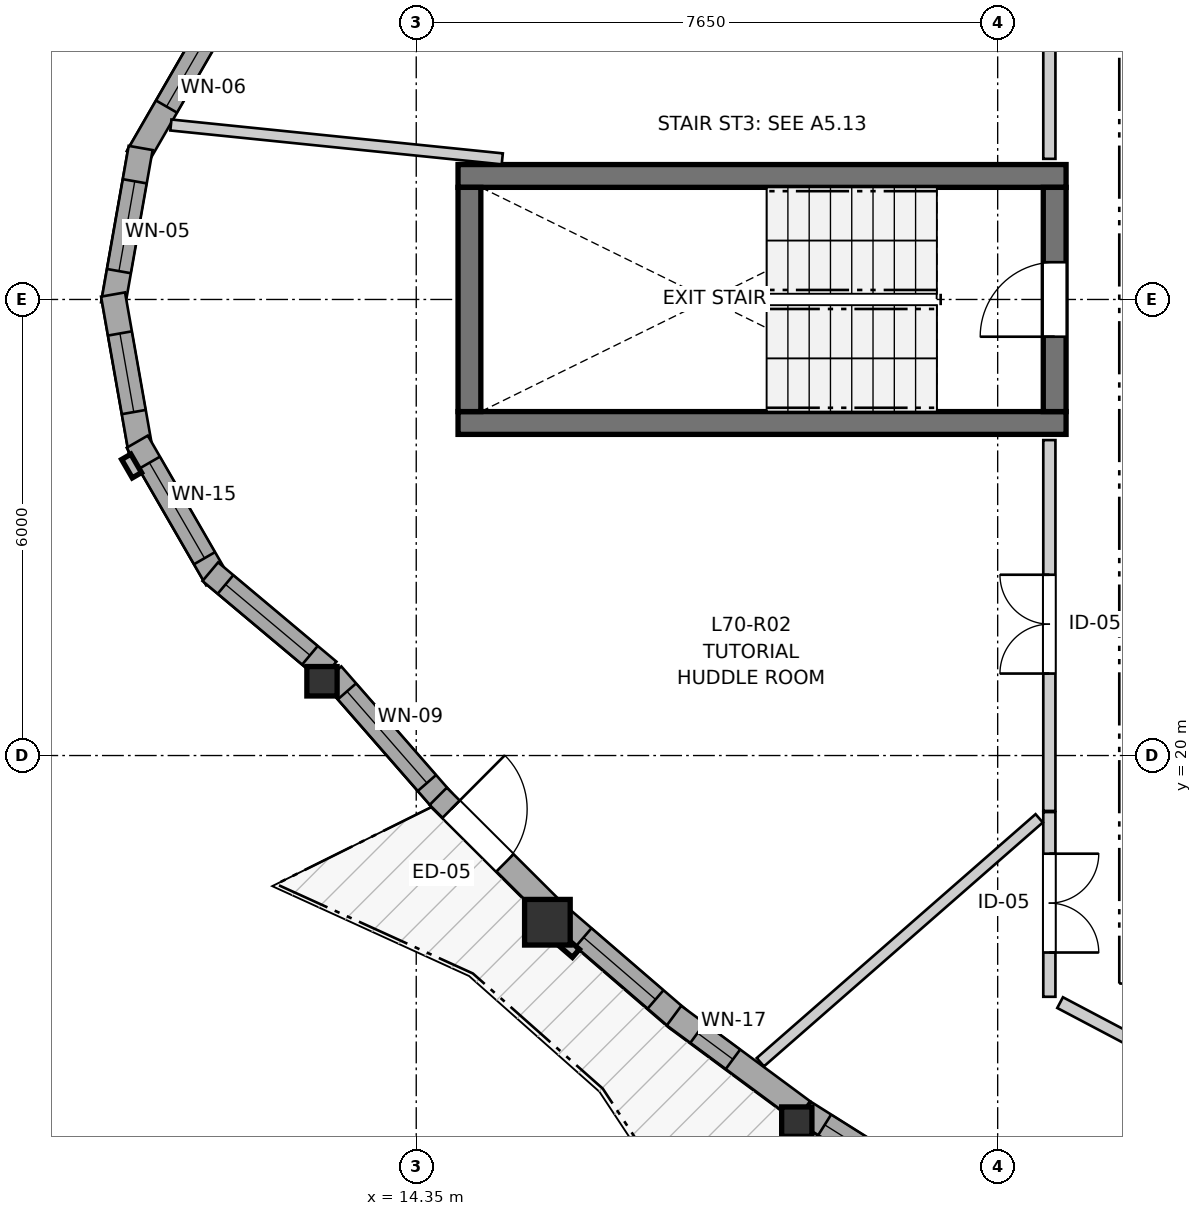
"""IFC4 building model, lengths in metres.
Left out: names, types, materials, properties, quantities, classifications, styles, units other than length and angle.
Written with IfcOpenShell. Run it as: python <this file> out.ifc"""

import sys

from ifc_helpers import new_model, si_unit, direction, frame, frame_2d, origin, origin_2d, place, context, subcontext, project, spatial, rectangle, i_section, extrude, source, transform, mapped, element, fill, save


model = new_model("IFC4")
c1 = context("Model", 3, precision=1e-05, world=origin(), true_north=direction((0.0, 1.0)))
c2 = subcontext(c1, "Body", "Model", "MODEL_VIEW")
j1 = project(units=[si_unit("LENGTHUNIT", "METRE"), si_unit("PLANEANGLEUNIT", "RADIAN")], contexts=[c1])
p1 = place(None, origin())
s1 = spatial("IfcSite", under=j1, at=p1, CompositionType="ELEMENT")
p2 = place(p1, origin())
s2 = spatial("IfcBuilding", under=s1, at=p2, CompositionType="ELEMENT")
p3 = place(p2, frame((0.0, 0.0, 234.0)))
s3 = spatial("IfcBuildingStorey", under=s2, at=p3, CompositionType="ELEMENT", Elevation=234.0)
for number, where, z_axis, x_axis in (
    (1, (14.9, 24.375, 0.0), (0.0, 0.0, 1.0), (1.0, 0.0, 0.0)),
    (2, (22.9, 27.625, 0.0), (0.0, 0.0, 1.0), (-1.0, 0.0, 0.0)),
):
    element("IfcWall", number, at=place(p3, frame(where, z_axis=z_axis, x_axis=x_axis)), inside=s3, PredefinedType="SHEAR", context=c2, shape_type="SweptSolid", body=[
        extrude(rectangle(XDim=8.0, YDim=0.3, at=frame_2d((4.0, 0.0))), origin(), (0.0, 0.0, 1.0), 2.96),
    ])
p4 = place(p3, frame((15.05, 27.475, 0.0), z_axis=(0.0, 0.0, 1.0), x_axis=(0.0, -1.0, 0.0)))
e3 = element("IfcWall", 3, at=p4, inside=s3, PredefinedType="SHEAR", context=c2, shape_type="SweptSolid", body=[
    extrude(rectangle(XDim=2.95, YDim=0.3, at=frame_2d((1.475, 0.0))), origin(), (0.0, 0.0, 1.0), 2.96),
])
p5 = place(p3, frame((22.75, 24.525, 0.0), z_axis=(0.0, 0.0, 1.0), x_axis=(0.0, 1.0, 0.0)))
e4 = element("IfcWall", 4, at=p5, inside=s3, PredefinedType="SHEAR", context=c2, shape_type="SweptSolid", body=[
    extrude(rectangle(XDim=2.95, YDim=0.3, at=frame_2d((1.475, 0.0))), origin(), (0.0, 0.0, 1.0), 2.96),
])
p6 = place(p5, frame((0.985, 0.0, 0.0)))
e5 = element("IfcOpeningElement", 5, at=p6, cuts=e4, PredefinedType="OPENING", context=c2, shape_type="SweptSolid", body=[
    extrude(rectangle(XDim=0.98, YDim=2.15, at=frame_2d((0.49, 1.075))), frame((0.0, 0.16, 0.0), z_axis=(0.0, -1.0, 0.0), x_axis=(1.0, 0.0, 0.0)), (0.0, 0.0, 1.0), 0.32),
])
m1 = source(origin(), c2, "Body", "SweptSolid", [
    extrude(i_section(OverallWidth=0.398, OverallDepth=0.387, WebThickness=0.019, FlangeThickness=0.03, FilletRadius=0.015, at=origin_2d()), origin(), (0.0, 0.0, 1.0), 2.96),
])
p7 = place(p3, frame((13.11, 20.977, 0.0), z_axis=(0.0, 0.0, 1.0), x_axis=(1.0, 0.0, 0.0)))
e6 = element("IfcColumn", 6, at=p7, inside=s3, PredefinedType="PILASTER", context=c2, shape_type="MappedRepresentation", body=[
    mapped(m1, transform((0.0, 0.0, 0.0), x_axis=(1.0, 0.0, 0.0), y_axis=(0.0, 1.0, 0.0), z_axis=(0.0, 0.0, 1.0), scale=1.0)),
])
m2 = source(origin(), c2, "Body", "SweptSolid", [
    extrude(rectangle(XDim=0.6, YDim=0.6, at=origin_2d()), origin(), (0.0, 0.0, 1.0), 2.96),
])
p8 = place(p3, frame((16.076, 17.807, 0.0), z_axis=(0.0, 0.0, 1.0), x_axis=(1.0, 0.0, 0.0)))
e7 = element("IfcColumn", 7, at=p8, inside=s3, PredefinedType="COLUMN", context=c2, shape_type="MappedRepresentation", body=[
    mapped(m2, transform((0.0, 0.0, 0.0), x_axis=(1.0, 0.0, 0.0), y_axis=(0.0, 1.0, 0.0), z_axis=(0.0, 0.0, 1.0), scale=1.0)),
])
p9 = place(p3, frame((19.357, 15.183, 0.0), z_axis=(0.0, 0.0, 1.0), x_axis=(1.0, 0.0, 0.0)))
e8 = element("IfcColumn", 8, at=p9, inside=s3, PredefinedType="PILASTER", context=c2, shape_type="MappedRepresentation", body=[
    mapped(m1, transform((0.0, 0.0, 0.0), x_axis=(1.0, 0.0, 0.0), y_axis=(0.0, 1.0, 0.0), z_axis=(0.0, 0.0, 1.0), scale=1.0)),
])
p10 = place(p3, frame((11.725, 29.681, 0.0), z_axis=(0.0, 0.0, 1.0), x_axis=(-0.499995423472, -0.866028046028, 0.0)))
e9 = element("IfcWall", 9, at=p10, inside=s3, PredefinedType="SOLIDWALL", context=c2, shape_type="SweptSolid", body=[
    extrude(rectangle(XDim=2.09, YDim=0.32, at=frame_2d((1.045, 0.0))), origin(), (0.0, 0.0, 1.0), 2.58),
])
p11 = place(p10, frame((0.27, 0.0, 0.82)))
e10 = element("IfcOpeningElement", 10, at=p11, cuts=e9, PredefinedType="OPENING", context=c2, shape_type="SweptSolid", body=[
    extrude(rectangle(XDim=1.05, YDim=1.45, at=frame_2d((0.525, 0.725))), frame((0.0, 0.17, 0.0), z_axis=(0.0, -1.0, 0.0), x_axis=(1.0, 0.0, 0.0)), (0.0, 0.0, 1.0), 0.34),
])
p12 = place(p3, frame((10.724, 27.993, 0.0), z_axis=(0.0, 0.0, 1.0), x_axis=(-0.173672066494, -0.984803540469, 0.0)))
e11 = element("IfcWall", 11, at=p12, inside=s3, PredefinedType="SOLIDWALL", context=c2, shape_type="SweptSolid", body=[
    extrude(rectangle(XDim=2.09, YDim=0.32, at=frame_2d((1.045, 0.0))), origin(), (0.0, 0.0, 1.0), 2.58),
])
p13 = place(p12, frame((0.445, 0.0, 0.82)))
e12 = element("IfcOpeningElement", 12, at=p13, cuts=e11, PredefinedType="OPENING", context=c2, shape_type="SweptSolid", body=[
    extrude(rectangle(XDim=1.2, YDim=1.45, at=frame_2d((0.6, 0.725))), frame((0.0, 0.17, 0.0), z_axis=(0.0, -1.0, 0.0), x_axis=(1.0, 0.0, 0.0)), (0.0, 0.0, 1.0), 0.34),
])
p14 = place(p3, frame((10.361, 26.065, 0.0), z_axis=(0.0, 0.0, 1.0), x_axis=(0.173672066494, -0.984803540469, 0.0)))
e13 = element("IfcWall", 13, at=p14, inside=s3, PredefinedType="SOLIDWALL", context=c2, shape_type="SweptSolid", body=[
    extrude(rectangle(XDim=2.09, YDim=0.32, at=frame_2d((1.045, 0.0))), origin(), (0.0, 0.0, 1.0), 2.58),
])
p15 = place(p14, frame((0.52, 0.0, 0.82)))
e14 = element("IfcOpeningElement", 14, at=p15, cuts=e13, PredefinedType="OPENING", context=c2, shape_type="SweptSolid", body=[
    extrude(rectangle(XDim=1.05, YDim=1.45, at=frame_2d((0.525, 0.725))), frame((0.0, 0.17, 0.0), z_axis=(0.0, -1.0, 0.0), x_axis=(1.0, 0.0, 0.0)), (0.0, 0.0, 1.0), 0.34),
])
p16 = place(p3, frame((10.679, 24.129, 0.0), z_axis=(0.0, 0.0, 1.0), x_axis=(0.499995423472, -0.866028046028, 0.0)))
e15 = element("IfcWall", 15, at=p16, inside=s3, PredefinedType="SOLIDWALL", context=c2, shape_type="SweptSolid", body=[
    extrude(rectangle(XDim=2.09, YDim=0.32, at=frame_2d((1.045, 0.0))), origin(), (0.0, 0.0, 1.0), 2.58),
])
p17 = place(p16, frame((0.32, 0.0, 0.82)))
e16 = element("IfcOpeningElement", 16, at=p17, cuts=e15, PredefinedType="OPENING", context=c2, shape_type="SweptSolid", body=[
    extrude(rectangle(XDim=1.45, YDim=1.25, at=frame_2d((0.725, 0.625))), frame((0.0, 0.17, 0.0), z_axis=(0.0, -1.0, 0.0), x_axis=(1.0, 0.0, 0.0)), (0.0, 0.0, 1.0), 0.34),
])
p18 = place(p3, frame((11.641, 22.419, 0.0), z_axis=(0.0, 0.0, 1.0), x_axis=(0.766099948115, -0.642721455608, 0.0)))
e17 = element("IfcWall", 17, at=p18, inside=s3, PredefinedType="SOLIDWALL", context=c2, shape_type="SweptSolid", body=[
    extrude(rectangle(XDim=2.032, YDim=0.32, at=frame_2d((1.016, 0.0))), origin(), (0.0, 0.0, 1.0), 2.58),
])
p19 = place(p18, frame((0.261, 0.0, 0.82)))
e18 = element("IfcOpeningElement", 18, at=p19, cuts=e17, PredefinedType="OPENING", context=c2, shape_type="SweptSolid", body=[
    extrude(rectangle(XDim=1.45, YDim=1.25, at=frame_2d((0.725, 0.625))), frame((0.0, 0.17, 0.0), z_axis=(0.0, -1.0, 0.0), x_axis=(1.0, 0.0, 0.0)), (0.0, 0.0, 1.0), 0.34),
])
p20 = place(p3, frame((13.244, 21.067, 0.0), z_axis=(0.0, 0.0, 1.0), x_axis=(0.657605974143, -0.753362052914, 0.0)))
e19 = element("IfcWall", 19, at=p20, inside=s3, PredefinedType="SOLIDWALL", context=c2, shape_type="SweptSolid", body=[
    extrude(rectangle(XDim=2.213, YDim=0.32, at=frame_2d((1.106, 0.0))), origin(), (0.0, 0.0, 1.0), 2.58),
])
p21 = place(p20, frame((0.296, 0.0, 0.82)))
e20 = element("IfcOpeningElement", 20, at=p21, cuts=e19, PredefinedType="OPENING", context=c2, shape_type="SweptSolid", body=[
    extrude(rectangle(XDim=1.6, YDim=1.35, at=frame_2d((0.8, 0.675))), frame((0.0, 0.17, 0.0), z_axis=(0.0, -1.0, 0.0), x_axis=(1.0, 0.0, 0.0)), (0.0, 0.0, 1.0), 0.34),
])
p22 = place(p3, frame((14.639, 19.464, 0.0), z_axis=(0.0, 0.0, 1.0), x_axis=(0.708386188287, -0.705825054985, 0.0)))
e21 = element("IfcWall", 21, at=p22, inside=s3, PredefinedType="SOLIDWALL", context=c2, shape_type="SweptSolid", body=[
    extrude(rectangle(XDim=2.097, YDim=0.32, at=frame_2d((1.049, 0.0))), origin(), (0.0, 0.0, 1.0), 2.58),
])
p23 = place(p22, frame((0.24, 0.0, 0.0)))
e22 = element("IfcOpeningElement", 22, at=p23, cuts=e21, PredefinedType="OPENING", context=c2, shape_type="SweptSolid", body=[
    extrude(rectangle(XDim=1.0, YDim=2.1, at=frame_2d((0.5, 1.05))), frame((0.0, 0.17, 0.0), z_axis=(0.0, -1.0, 0.0), x_axis=(1.0, 0.0, 0.0)), (0.0, 0.0, 1.0), 0.34),
])
p24 = place(p3, frame((16.248, 17.869, 0.0), z_axis=(0.0, 0.0, 1.0), x_axis=(0.757506883098, -0.652827176257, 0.0)))
e23 = element("IfcWall", 23, at=p24, inside=s3, PredefinedType="SOLIDWALL", context=c2, shape_type="SweptSolid", body=[
    extrude(rectangle(XDim=2.062, YDim=0.32, at=frame_2d((1.031, 0.0))), origin(), (0.0, 0.0, 1.0), 2.58),
])
p25 = place(p24, frame((0.401, 0.0, 0.82)))
e24 = element("IfcOpeningElement", 24, at=p25, cuts=e23, PredefinedType="OPENING", context=c2, shape_type="SweptSolid", body=[
    extrude(rectangle(XDim=1.25, YDim=1.35, at=frame_2d((0.625, 0.675))), frame((0.0, 0.17, 0.0), z_axis=(0.0, -1.0, 0.0), x_axis=(1.0, 0.0, 0.0)), (0.0, 0.0, 1.0), 0.34),
])
p26 = place(p3, frame((17.741, 16.578, 0.0), z_axis=(0.0, 0.0, 1.0), x_axis=(0.803860727082, -0.594817561489, 0.0)))
e25 = element("IfcWall", 25, at=p26, inside=s3, PredefinedType="SOLIDWALL", context=c2, shape_type="SweptSolid", body=[
    extrude(rectangle(XDim=2.108, YDim=0.32, at=frame_2d((1.054, 0.0))), origin(), (0.0, 0.0, 1.0), 2.58),
])
p27 = place(p26, frame((0.385, 0.0, 0.82)))
e26 = element("IfcOpeningElement", 26, at=p27, cuts=e25, PredefinedType="OPENING", context=c2, shape_type="SweptSolid", body=[
    extrude(rectangle(XDim=0.58, YDim=1.35, at=frame_2d((0.29, 0.675))), frame((0.0, 0.17, 0.0), z_axis=(0.0, -1.0, 0.0), x_axis=(1.0, 0.0, 0.0)), (0.0, 0.0, 1.0), 0.34),
])
p28 = place(p3, frame((19.459, 15.308, 0.0), z_axis=(0.0, 0.0, 1.0), x_axis=(0.846450593439, -0.532467269291, 0.0)))
e27 = element("IfcWall", 27, at=p28, inside=s3, PredefinedType="SOLIDWALL", context=c2, shape_type="SweptSolid", body=[
    extrude(rectangle(XDim=2.096, YDim=0.32, at=frame_2d((1.048, 0.0))), origin(), (0.0, 0.0, 1.0), 2.58),
])
p29 = place(p28, frame((0.313, 0.0, 0.82)))
e28 = element("IfcOpeningElement", 28, at=p29, cuts=e27, PredefinedType="OPENING", context=c2, shape_type="SweptSolid", body=[
    extrude(rectangle(XDim=1.45, YDim=1.25, at=frame_2d((0.725, 0.625))), frame((0.0, 0.17, 0.0), z_axis=(0.0, -1.0, 0.0), x_axis=(1.0, 0.0, 0.0)), (0.0, 0.0, 1.0), 0.34),
])
p30 = place(p3, frame((22.68, 19.271, 0.0), z_axis=(0.0, 0.0, 1.0), x_axis=(0.0, 1.0, 0.0)))
e29 = element("IfcWall", 29, at=p30, inside=s3, PredefinedType="PARTITIONING", context=c2, shape_type="SweptSolid", body=[
    extrude(rectangle(XDim=4.879, YDim=0.16, at=frame_2d((2.439, 0.0))), origin(), (0.0, 0.0, 1.0), 2.96),
])
p31 = place(p30, frame((1.808, 0.0, 0.0)))
e30 = element("IfcOpeningElement", 30, at=p31, cuts=e29, PredefinedType="OPENING", context=c2, shape_type="SweptSolid", body=[
    extrude(rectangle(XDim=1.3, YDim=2.1, at=frame_2d((0.65, 1.05))), frame((0.0, 0.09, 0.0), z_axis=(0.0, -1.0, 0.0), x_axis=(1.0, 0.0, 0.0)), (0.0, 0.0, 1.0), 0.18),
])
p32 = place(p3, frame((22.68, 27.85, 0.0), z_axis=(0.0, 0.0, 1.0), x_axis=(0.0, 1.0, 0.0)))
e31 = element("IfcWall", 31, at=p32, inside=s3, PredefinedType="PARTITIONING", context=c2, shape_type="SweptSolid", body=[
    extrude(rectangle(XDim=4.569, YDim=0.16, at=frame_2d((2.284, 0.0))), origin(), (0.0, 0.0, 1.0), 2.96),
])
p33 = place(p32, frame((1.824, 0.0, 0.0)))
e32 = element("IfcOpeningElement", 32, at=p33, cuts=e31, PredefinedType="OPENING", context=c2, shape_type="SweptSolid", body=[
    extrude(rectangle(XDim=0.96, YDim=2.1, at=frame_2d((0.48, 1.05))), frame((0.0, 0.09, 0.0), z_axis=(0.0, -1.0, 0.0), x_axis=(1.0, 0.0, 0.0)), (0.0, 0.0, 1.0), 0.18),
])
p34 = place(p3, frame((22.68, 19.256, 0.0), z_axis=(0.0, 0.0, 1.0), x_axis=(0.0, -1.0, 0.0)))
e33 = element("IfcWall", 33, at=p34, inside=s3, PredefinedType="PARTITIONING", context=c2, shape_type="SweptSolid", body=[
    extrude(rectangle(XDim=2.43, YDim=0.16, at=frame_2d((1.215, 0.0))), origin(), (0.0, 0.0, 1.0), 2.96),
])
p35 = place(p34, frame((0.548, 0.0, 0.0)))
e34 = element("IfcOpeningElement", 34, at=p35, cuts=e33, PredefinedType="OPENING", context=c2, shape_type="SweptSolid", body=[
    extrude(rectangle(XDim=1.3, YDim=2.1, at=frame_2d((0.65, 1.05))), frame((0.0, 0.09, 0.0), z_axis=(0.0, -1.0, 0.0), x_axis=(1.0, 0.0, 0.0)), (0.0, 0.0, 1.0), 0.18),
])
p36 = place(p3, frame((18.877, 15.965, 0.0), z_axis=(0.0, 0.0, 1.0), x_axis=(0.752716311779, 0.65834501136, 0.0)))
e35 = element("IfcWall", 35, at=p36, inside=s3, PredefinedType="PARTITIONING", context=c2, shape_type="SweptSolid", body=[
    extrude(rectangle(XDim=4.874, YDim=0.145, at=frame_2d((2.437, 0.0))), origin(), (0.0, 0.0, 1.0), 2.96),
])
p37 = place(p3, frame((11.122, 28.295, 0.0), z_axis=(0.0, 0.0, 1.0), x_axis=(0.994824263869, -0.101610452307, 0.0)))
e36 = element("IfcWall", 36, at=p37, inside=s3, PredefinedType="PARTITIONING", context=c2, shape_type="SweptSolid", body=[
    extrude(rectangle(XDim=4.383, YDim=0.145, at=frame_2d((2.191, 0.0))), origin(), (0.0, 0.0, 1.0), 2.96),
])
p38 = place(p3, frame((22.821, 16.749, 0.0), z_axis=(0.0, 0.0, 1.0), x_axis=(0.884429955183, -0.466672962979, 0.0)))
e37 = element("IfcWall", 37, at=p38, inside=s3, PredefinedType="PARTITIONING", context=c2, shape_type="SweptSolid", body=[
    extrude(rectangle(XDim=1.672, YDim=0.16, at=frame_2d((0.836, 0.0))), origin(), (0.0, 0.0, 1.0), 2.96),
])
m3 = source(origin(), c2, "Body", "SweptSolid", [
    extrude(rectangle(XDim=1.05, YDim=1.45, at=frame_2d((0.525, 0.725))), frame((0.0, 0.03, 0.0), z_axis=(0.0, -1.0, 0.0), x_axis=(1.0, 0.0, 0.0)), (0.0, 0.0, 1.0), 0.06),
])
p39 = place(p11, origin())
e38 = element("IfcWindow", 38, at=p39, inside=s3, PartitioningType="SINGLE_PANEL", PredefinedType="WINDOW", context=c2, shape_type="MappedRepresentation", body=[
    mapped(m3, transform((0.0, 0.0, 0.0), x_axis=(1.0, 0.0, 0.0), y_axis=(0.0, 1.0, 0.0), z_axis=(0.0, 0.0, 1.0), scale=1.0)),
])
fill(e10, e38)
m4 = source(origin(), c2, "Body", "SweptSolid", [
    extrude(rectangle(XDim=1.2, YDim=1.45, at=frame_2d((0.6, 0.725))), frame((0.0, 0.03, 0.0), z_axis=(0.0, -1.0, 0.0), x_axis=(1.0, 0.0, 0.0)), (0.0, 0.0, 1.0), 0.06),
])
p40 = place(p13, origin())
e39 = element("IfcWindow", 39, at=p40, inside=s3, PartitioningType="SINGLE_PANEL", PredefinedType="WINDOW", context=c2, shape_type="MappedRepresentation", body=[
    mapped(m4, transform((0.0, 0.0, 0.0), x_axis=(1.0, 0.0, 0.0), y_axis=(0.0, 1.0, 0.0), z_axis=(0.0, 0.0, 1.0), scale=1.0)),
])
fill(e12, e39)
p41 = place(p15, origin())
e40 = element("IfcWindow", 40, at=p41, inside=s3, PartitioningType="SINGLE_PANEL", PredefinedType="WINDOW", context=c2, shape_type="MappedRepresentation", body=[
    mapped(m3, transform((0.0, 0.0, 0.0), x_axis=(1.0, 0.0, 0.0), y_axis=(0.0, 1.0, 0.0), z_axis=(0.0, 0.0, 1.0), scale=1.0)),
])
fill(e14, e40)
m5 = source(origin(), c2, "Body", "SweptSolid", [
    extrude(rectangle(XDim=1.45, YDim=1.25, at=frame_2d((0.725, 0.625))), frame((0.0, 0.03, 0.0), z_axis=(0.0, -1.0, 0.0), x_axis=(1.0, 0.0, 0.0)), (0.0, 0.0, 1.0), 0.06),
])
p42 = place(p17, origin())
e41 = element("IfcWindow", 41, at=p42, inside=s3, PartitioningType="SINGLE_PANEL", PredefinedType="WINDOW", context=c2, shape_type="MappedRepresentation", body=[
    mapped(m5, transform((0.0, 0.0, 0.0), x_axis=(1.0, 0.0, 0.0), y_axis=(0.0, 1.0, 0.0), z_axis=(0.0, 0.0, 1.0), scale=1.0)),
])
fill(e16, e41)
p43 = place(p19, origin())
e42 = element("IfcWindow", 42, at=p43, inside=s3, PartitioningType="SINGLE_PANEL", PredefinedType="WINDOW", context=c2, shape_type="MappedRepresentation", body=[
    mapped(m5, transform((0.0, 0.0, 0.0), x_axis=(1.0, 0.0, 0.0), y_axis=(0.0, 1.0, 0.0), z_axis=(0.0, 0.0, 1.0), scale=1.0)),
])
fill(e18, e42)
m6 = source(origin(), c2, "Body", "SweptSolid", [
    extrude(rectangle(XDim=1.6, YDim=1.35, at=frame_2d((0.8, 0.675))), frame((0.0, 0.03, 0.0), z_axis=(0.0, -1.0, 0.0), x_axis=(1.0, 0.0, 0.0)), (0.0, 0.0, 1.0), 0.06),
])
p44 = place(p21, origin())
e43 = element("IfcWindow", 43, at=p44, inside=s3, PartitioningType="SINGLE_PANEL", PredefinedType="WINDOW", context=c2, shape_type="MappedRepresentation", body=[
    mapped(m6, transform((0.0, 0.0, 0.0), x_axis=(1.0, 0.0, 0.0), y_axis=(0.0, 1.0, 0.0), z_axis=(0.0, 0.0, 1.0), scale=1.0)),
])
fill(e20, e43)
m7 = source(origin(), c2, "Body", "SweptSolid", [
    extrude(rectangle(XDim=1.25, YDim=1.35, at=frame_2d((0.625, 0.675))), frame((0.0, 0.03, 0.0), z_axis=(0.0, -1.0, 0.0), x_axis=(1.0, 0.0, 0.0)), (0.0, 0.0, 1.0), 0.06),
])
p45 = place(p25, origin())
e44 = element("IfcWindow", 44, at=p45, inside=s3, PartitioningType="SINGLE_PANEL", PredefinedType="WINDOW", context=c2, shape_type="MappedRepresentation", body=[
    mapped(m7, transform((0.0, 0.0, 0.0), x_axis=(1.0, 0.0, 0.0), y_axis=(0.0, 1.0, 0.0), z_axis=(0.0, 0.0, 1.0), scale=1.0)),
])
fill(e24, e44)
m8 = source(origin(), c2, "Body", "SweptSolid", [
    extrude(rectangle(XDim=0.58, YDim=1.35, at=frame_2d((0.29, 0.675))), frame((0.0, 0.03, 0.0), z_axis=(0.0, -1.0, 0.0), x_axis=(1.0, 0.0, 0.0)), (0.0, 0.0, 1.0), 0.06),
])
p46 = place(p27, origin())
e45 = element("IfcWindow", 45, at=p46, inside=s3, PartitioningType="SINGLE_PANEL", PredefinedType="WINDOW", context=c2, shape_type="MappedRepresentation", body=[
    mapped(m8, transform((0.0, 0.0, 0.0), x_axis=(1.0, 0.0, 0.0), y_axis=(0.0, 1.0, 0.0), z_axis=(0.0, 0.0, 1.0), scale=1.0)),
])
fill(e26, e45)
p47 = place(p29, origin())
e46 = element("IfcWindow", 46, at=p47, inside=s3, PartitioningType="SINGLE_PANEL", PredefinedType="WINDOW", context=c2, shape_type="MappedRepresentation", body=[
    mapped(m5, transform((0.0, 0.0, 0.0), x_axis=(1.0, 0.0, 0.0), y_axis=(0.0, 1.0, 0.0), z_axis=(0.0, 0.0, 1.0), scale=1.0)),
])
fill(e28, e46)
m9 = source(origin(), c2, "Body", "SweptSolid", [
    extrude(rectangle(XDim=1.0, YDim=2.1, at=frame_2d((0.5, 1.05))), frame((0.0, 0.025, 0.0), z_axis=(0.0, -1.0, 0.0), x_axis=(1.0, 0.0, 0.0)), (0.0, 0.0, 1.0), 0.05),
])
p48 = place(p23, origin())
e47 = element("IfcDoor", 47, at=p48, inside=s3, OperationType="SINGLE_SWING_LEFT", PredefinedType="DOOR", context=c2, shape_type="MappedRepresentation", body=[
    mapped(m9, transform((0.0, 0.0, 0.0), x_axis=(1.0, 0.0, 0.0), y_axis=(0.0, 1.0, 0.0), z_axis=(0.0, 0.0, 1.0), scale=1.0)),
])
fill(e22, e47)
m10 = source(origin(), c2, "Body", "SweptSolid", [
    extrude(rectangle(XDim=0.98, YDim=2.15, at=frame_2d((0.49, 1.075))), frame((0.0, 0.025, 0.0), z_axis=(0.0, -1.0, 0.0), x_axis=(1.0, 0.0, 0.0)), (0.0, 0.0, 1.0), 0.05),
])
p49 = place(p6, origin())
e48 = element("IfcDoor", 48, at=p49, inside=s3, OperationType="SINGLE_SWING_LEFT", PredefinedType="DOOR", context=c2, shape_type="MappedRepresentation", body=[
    mapped(m10, transform((0.0, 0.0, 0.0), x_axis=(1.0, 0.0, 0.0), y_axis=(0.0, 1.0, 0.0), z_axis=(0.0, 0.0, 1.0), scale=1.0)),
])
fill(e5, e48)
m11 = source(origin(), c2, "Body", "SweptSolid", [
    extrude(rectangle(XDim=1.3, YDim=2.1, at=frame_2d((0.65, 1.05))), frame((0.0, 0.025, 0.0), z_axis=(0.0, -1.0, 0.0), x_axis=(1.0, 0.0, 0.0)), (0.0, 0.0, 1.0), 0.05),
])
p50 = place(p31, origin())
e49 = element("IfcDoor", 49, at=p50, inside=s3, OperationType="DOUBLE_DOOR_SINGLE_SWING", PredefinedType="DOOR", context=c2, shape_type="MappedRepresentation", body=[
    mapped(m11, transform((0.0, 0.0, 0.0), x_axis=(1.0, 0.0, 0.0), y_axis=(0.0, 1.0, 0.0), z_axis=(0.0, 0.0, 1.0), scale=1.0)),
])
fill(e30, e49)
p51 = place(p35, origin())
e50 = element("IfcDoor", 50, at=p51, inside=s3, OperationType="DOUBLE_DOOR_SINGLE_SWING", PredefinedType="DOOR", context=c2, shape_type="MappedRepresentation", body=[
    mapped(m11, transform((0.0, 0.0, 0.0), x_axis=(1.0, 0.0, 0.0), y_axis=(0.0, 1.0, 0.0), z_axis=(0.0, 0.0, 1.0), scale=1.0)),
])
fill(e34, e50)
save(model, sys.argv[1])
